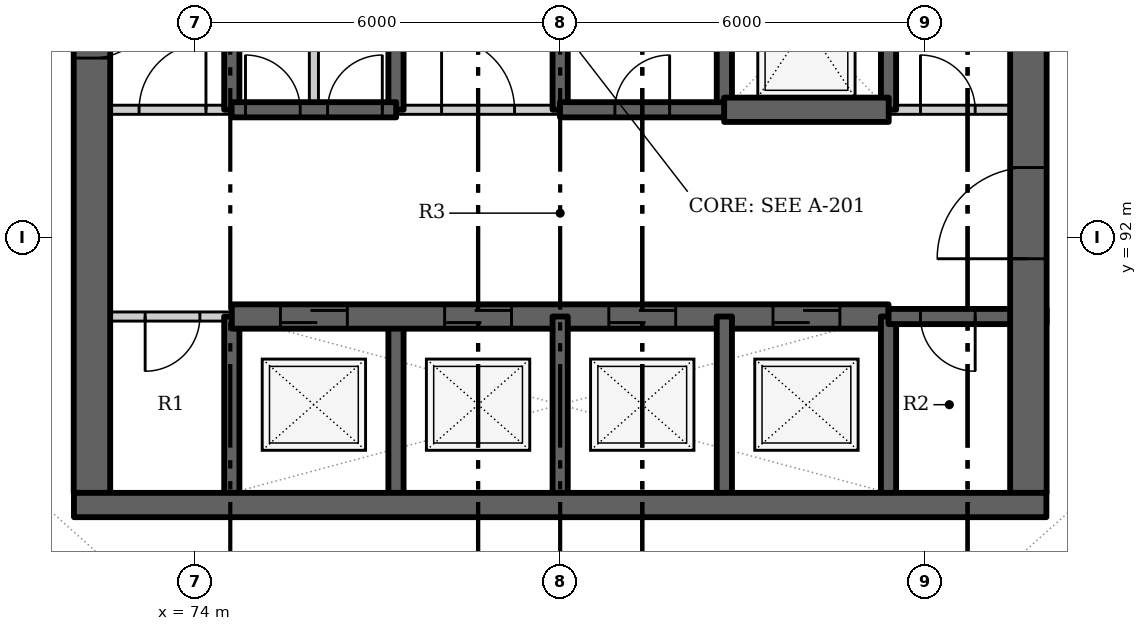
"""IFC4 building model, lengths in metres.
Left out: names, types, materials, properties, quantities, classifications, styles, units other than length and angle.
Written with IfcOpenShell. Run it as: python <this file> out.ifc"""

import sys

from ifc_helpers import new_model, si_unit, direction, frame, frame_2d, origin, place, context, subcontext, project, spatial, rectangle, extrude, element, fill, save


model = new_model("IFC4")
c1 = context("Model", 3, precision=1e-05, world=origin(), true_north=direction((0.0, 1.0)))
c2 = subcontext(c1, "Body", "Model", "MODEL_VIEW")
j1 = project(units=[si_unit("LENGTHUNIT", "METRE"), si_unit("PLANEANGLEUNIT", "RADIAN")], contexts=[c1])
p1 = place(None, origin())
s1 = spatial("IfcSite", under=j1, at=p1, CompositionType="ELEMENT")
p2 = place(p1, origin())
s2 = spatial("IfcBuilding", under=s1, at=p2, CompositionType="ELEMENT")
p3 = place(p2, origin())
s3 = spatial("IfcBuildingStorey", under=s2, at=p3, CompositionType="ELEMENT", Elevation=0.0)
p4 = place(p3, frame((74.6, 87.8, -1.8), z_axis=(0.0, 0.0, 1.0), x_axis=(0.0, 1.0, 0.0)))
e1 = element("IfcWall", 1, at=p4, inside=s3, PredefinedType="SHEAR", context=c2, shape_type="SweptSolid", body=[
    extrude(rectangle(XDim=2.9, YDim=0.25, at=frame_2d((1.45, 0.0))), origin(), (0.0, 0.0, 1.0), 8.1),
])
p5 = place(p3, frame((74.6, 94.1, -1.8), z_axis=(0.0, 0.0, 1.0), x_axis=(0.0, 1.0, 0.0)))
e2 = element("IfcWall", 2, at=p5, inside=s3, PredefinedType="SHEAR", context=c2, shape_type="SweptSolid", body=[
    extrude(rectangle(XDim=2.8, YDim=0.25, at=frame_2d((1.4, 0.0))), origin(), (0.0, 0.0, 1.0), 8.1),
])
p6 = place(p3, frame((74.6, 90.7, 0.0), z_axis=(0.0, 0.0, 1.0), x_axis=(-1.0, 0.0, 0.0)))
e3 = element("IfcWall", 3, at=p6, inside=s3, PredefinedType="PARTITIONING", context=c2, shape_type="SweptSolid", body=[
    extrude(rectangle(XDim=2.6, YDim=0.15, at=frame_2d((1.3, 0.0))), origin(), (0.0, 0.0, 1.0), 6.3),
])
p7 = place(p6, frame((0.525, 0.0, 0.0)))
e4 = element("IfcOpeningElement", 4, at=p7, cuts=e3, PredefinedType="OPENING", context=c2, shape_type="SweptSolid", body=[
    extrude(rectangle(XDim=0.9, YDim=2.1, at=frame_2d((0.45, 1.05))), frame((0.0, 0.085, 0.0), z_axis=(0.0, -1.0, 0.0), x_axis=(1.0, 0.0, 0.0)), (0.0, 0.0, 1.0), 0.17),
])
p8 = place(p3, frame((72.3, 96.9, -1.8), z_axis=(0.0, 0.0, 1.0), x_axis=(0.0, -1.0, 0.0)))
e5 = element("IfcWall", 5, at=p8, inside=s3, PredefinedType="SHEAR", context=c2, shape_type="SweptSolid", body=[
    extrude(rectangle(XDim=9.1, YDim=0.6, at=frame_2d((4.55, 0.0))), origin(), (0.0, 0.0, 1.0), 8.1),
])
p9 = place(p8, frame((0.85, 0.0, 1.8)))
e6 = element("IfcOpeningElement", 6, at=p9, cuts=e5, PredefinedType="OPENING", context=c2, shape_type="SweptSolid", body=[
    extrude(rectangle(XDim=1.1, YDim=2.1, at=frame_2d((0.55, 1.05))), frame((0.0, 0.31, 0.0), z_axis=(0.0, -1.0, 0.0), x_axis=(1.0, 0.0, 0.0)), (0.0, 0.0, 1.0), 0.62),
])
p10 = place(p3, frame((77.3, 87.8, -1.8), z_axis=(0.0, 0.0, 1.0), x_axis=(0.0, 1.0, 0.0)))
e7 = element("IfcWall", 7, at=p10, inside=s3, PredefinedType="SHEAR", context=c2, shape_type="SweptSolid", body=[
    extrude(rectangle(XDim=2.9, YDim=0.25, at=frame_2d((1.45, 0.0))), origin(), (0.0, 0.0, 1.0), 8.1),
])
p11 = place(p3, frame((77.3, 94.1, -1.8), z_axis=(0.0, 0.0, 1.0), x_axis=(0.0, 1.0, 0.0)))
e8 = element("IfcWall", 8, at=p11, inside=s3, PredefinedType="SHEAR", context=c2, shape_type="SweptSolid", body=[
    extrude(rectangle(XDim=2.8, YDim=0.25, at=frame_2d((1.4, 0.0))), origin(), (0.0, 0.0, 1.0), 8.1),
])
p12 = place(p3, frame((74.6, 90.7, -1.8), z_axis=(0.0, 0.0, 1.0), x_axis=(1.0, 0.0, 0.0)))
e9 = element("IfcWall", 9, at=p12, inside=s3, PredefinedType="SHEAR", context=c2, shape_type="SweptSolid", body=[
    extrude(rectangle(XDim=10.8, YDim=0.4, at=frame_2d((5.4, 0.0))), origin(), (0.0, 0.0, 1.0), 8.1),
])
p13 = place(p12, frame((0.8, 0.0, 1.8)))
e10 = element("IfcOpeningElement", 10, at=p13, cuts=e9, PredefinedType="OPENING", context=c2, shape_type="SweptSolid", body=[
    extrude(rectangle(XDim=1.1, YDim=2.1, at=frame_2d((0.55, 1.05))), frame((0.0, 0.21, 0.0), z_axis=(0.0, -1.0, 0.0), x_axis=(1.0, 0.0, 0.0)), (0.0, 0.0, 1.0), 0.42),
])
p14 = place(p12, frame((3.5, 0.0, 1.8)))
e11 = element("IfcOpeningElement", 11, at=p14, cuts=e9, PredefinedType="OPENING", context=c2, shape_type="SweptSolid", body=[
    extrude(rectangle(XDim=1.1, YDim=2.1, at=frame_2d((0.55, 1.05))), frame((0.0, 0.21, 0.0), z_axis=(0.0, -1.0, 0.0), x_axis=(1.0, 0.0, 0.0)), (0.0, 0.0, 1.0), 0.42),
])
p15 = place(p12, frame((6.2, 0.0, 1.8)))
e12 = element("IfcOpeningElement", 12, at=p15, cuts=e9, PredefinedType="OPENING", context=c2, shape_type="SweptSolid", body=[
    extrude(rectangle(XDim=1.1, YDim=2.1, at=frame_2d((0.55, 1.05))), frame((0.0, 0.21, 0.0), z_axis=(0.0, -1.0, 0.0), x_axis=(1.0, 0.0, 0.0)), (0.0, 0.0, 1.0), 0.42),
])
p16 = place(p12, frame((8.9, 0.0, 1.8)))
e13 = element("IfcOpeningElement", 13, at=p16, cuts=e9, PredefinedType="OPENING", context=c2, shape_type="SweptSolid", body=[
    extrude(rectangle(XDim=1.1, YDim=2.1, at=frame_2d((0.55, 1.05))), frame((0.0, 0.21, 0.0), z_axis=(0.0, -1.0, 0.0), x_axis=(1.0, 0.0, 0.0)), (0.0, 0.0, 1.0), 0.42),
])
p17 = place(p3, frame((80.0, 87.8, -1.8), z_axis=(0.0, 0.0, 1.0), x_axis=(0.0, 1.0, 0.0)))
e14 = element("IfcWall", 14, at=p17, inside=s3, PredefinedType="SHEAR", context=c2, shape_type="SweptSolid", body=[
    extrude(rectangle(XDim=2.9, YDim=0.25, at=frame_2d((1.45, 0.0))), origin(), (0.0, 0.0, 1.0), 8.1),
])
p18 = place(p3, frame((80.0, 94.1, -1.8), z_axis=(0.0, 0.0, 1.0), x_axis=(0.0, 1.0, 0.0)))
e15 = element("IfcWall", 15, at=p18, inside=s3, PredefinedType="SHEAR", context=c2, shape_type="SweptSolid", body=[
    extrude(rectangle(XDim=2.8, YDim=0.25, at=frame_2d((1.4, 0.0))), origin(), (0.0, 0.0, 1.0), 8.1),
])
p19 = place(p3, frame((82.7, 87.8, -1.8), z_axis=(0.0, 0.0, 1.0), x_axis=(0.0, 1.0, 0.0)))
e16 = element("IfcWall", 16, at=p19, inside=s3, PredefinedType="SHEAR", context=c2, shape_type="SweptSolid", body=[
    extrude(rectangle(XDim=2.9, YDim=0.25, at=frame_2d((1.45, 0.0))), origin(), (0.0, 0.0, 1.0), 8.1),
])
p20 = place(p3, frame((82.7, 94.1, -1.8), z_axis=(0.0, 0.0, 1.0), x_axis=(0.0, 1.0, 0.0)))
e17 = element("IfcWall", 17, at=p20, inside=s3, PredefinedType="SHEAR", context=c2, shape_type="SweptSolid", body=[
    extrude(rectangle(XDim=2.8, YDim=0.25, at=frame_2d((1.4, 0.0))), origin(), (0.0, 0.0, 1.0), 8.1),
])
p21 = place(p3, frame((85.4, 87.8, -1.8), z_axis=(0.0, 0.0, 1.0), x_axis=(0.0, 1.0, 0.0)))
e18 = element("IfcWall", 18, at=p21, inside=s3, PredefinedType="SHEAR", context=c2, shape_type="SweptSolid", body=[
    extrude(rectangle(XDim=2.9, YDim=0.25, at=frame_2d((1.45, 0.0))), origin(), (0.0, 0.0, 1.0), 8.1),
])
p22 = place(p3, frame((85.4, 94.1, -1.8), z_axis=(0.0, 0.0, 1.0), x_axis=(0.0, 1.0, 0.0)))
e19 = element("IfcWall", 19, at=p22, inside=s3, PredefinedType="SHEAR", context=c2, shape_type="SweptSolid", body=[
    extrude(rectangle(XDim=2.8, YDim=0.25, at=frame_2d((1.4, 0.0))), origin(), (0.0, 0.0, 1.0), 8.1),
])
p23 = place(p3, frame((88.0, 90.7, -1.8), z_axis=(0.0, 0.0, 1.0), x_axis=(-1.0, 0.0, 0.0)))
e20 = element("IfcWall", 20, at=p23, inside=s3, PredefinedType="SHEAR", context=c2, shape_type="SweptSolid", body=[
    extrude(rectangle(XDim=2.6, YDim=0.25, at=frame_2d((1.3, 0.0))), origin(), (0.0, 0.0, 1.0), 8.1),
])
p24 = place(p23, frame((1.175, 0.0, 1.8)))
e21 = element("IfcOpeningElement", 21, at=p24, cuts=e20, PredefinedType="OPENING", context=c2, shape_type="SweptSolid", body=[
    extrude(rectangle(XDim=0.9, YDim=2.1, at=frame_2d((0.45, 1.05))), frame((0.0, 0.135, 0.0), z_axis=(0.0, -1.0, 0.0), x_axis=(1.0, 0.0, 0.0)), (0.0, 0.0, 1.0), 0.27),
])
p25 = place(p3, frame((87.7, 87.8, -1.8), z_axis=(0.0, 0.0, 1.0), x_axis=(0.0, 1.0, 0.0)))
e22 = element("IfcWall", 22, at=p25, inside=s3, PredefinedType="SHEAR", context=c2, shape_type="SweptSolid", body=[
    extrude(rectangle(XDim=15.6, YDim=0.6, at=frame_2d((7.8, 0.0))), origin(), (0.0, 0.0, 1.0), 8.1),
])
p26 = place(p25, frame((3.85, 0.0, 1.8)))
e23 = element("IfcOpeningElement", 23, at=p26, cuts=e22, PredefinedType="OPENING", context=c2, shape_type="SweptSolid", body=[
    extrude(rectangle(XDim=1.5, YDim=2.1, at=frame_2d((0.75, 1.05))), frame((0.0, 0.31, 0.0), z_axis=(0.0, -1.0, 0.0), x_axis=(1.0, 0.0, 0.0)), (0.0, 0.0, 1.0), 0.62),
])
p27 = place(p25, frame((11.799, 0.0, 1.8)))
e24 = element("IfcOpeningElement", 24, at=p27, cuts=e22, PredefinedType="OPENING", context=c2, shape_type="SweptSolid", body=[
    extrude(rectangle(XDim=1.1, YDim=2.1, at=frame_2d((0.55, 1.05))), frame((0.0, 0.31, 0.0), z_axis=(0.0, -1.0, 0.0), x_axis=(1.0, 0.0, 0.0)), (0.0, 0.0, 1.0), 0.62),
])
p28 = place(p3, frame((72.0, 94.1, 0.0), z_axis=(0.0, 0.0, 1.0), x_axis=(1.0, 0.0, 0.0)))
e25 = element("IfcWall", 25, at=p28, inside=s3, PredefinedType="PARTITIONING", context=c2, shape_type="SweptSolid", body=[
    extrude(rectangle(XDim=2.603, YDim=0.15, at=frame_2d((1.302, 0.0))), origin(), (0.0, 0.0, 1.0), 6.3),
])
p29 = place(p28, frame((1.075, 0.0, 0.0)))
e26 = element("IfcOpeningElement", 26, at=p29, cuts=e25, PredefinedType="OPENING", context=c2, shape_type="SweptSolid", body=[
    extrude(rectangle(XDim=1.1, YDim=2.1, at=frame_2d((0.55, 1.05))), frame((0.0, 0.085, 0.0), z_axis=(0.0, -1.0, 0.0), x_axis=(1.0, 0.0, 0.0)), (0.0, 0.0, 1.0), 0.17),
])
p30 = place(p3, frame((77.297, 94.1, 0.0), z_axis=(0.0, 0.0, 1.0), x_axis=(1.0, 0.0, 0.0)))
e27 = element("IfcWall", 27, at=p30, inside=s3, PredefinedType="PARTITIONING", context=c2, shape_type="SweptSolid", body=[
    extrude(rectangle(XDim=2.706, YDim=0.15, at=frame_2d((1.353, 0.0))), origin(), (0.0, 0.0, 1.0), 6.3),
])
p31 = place(p30, frame((0.753, 0.0, 0.0)))
e28 = element("IfcOpeningElement", 28, at=p31, cuts=e27, PredefinedType="OPENING", context=c2, shape_type="SweptSolid", body=[
    extrude(rectangle(XDim=1.2, YDim=2.1, at=frame_2d((0.6, 1.05))), frame((0.0, 0.085, 0.0), z_axis=(0.0, -1.0, 0.0), x_axis=(1.0, 0.0, 0.0)), (0.0, 0.0, 1.0), 0.17),
])
p32 = place(p3, frame((85.397, 94.1, 0.0), z_axis=(0.0, 0.0, 1.0), x_axis=(1.0, 0.0, 0.0)))
e29 = element("IfcWall", 29, at=p32, inside=s3, PredefinedType="PARTITIONING", context=c2, shape_type="SweptSolid", body=[
    extrude(rectangle(XDim=2.603, YDim=0.15, at=frame_2d((1.302, 0.0))), origin(), (0.0, 0.0, 1.0), 6.3),
])
p33 = place(p32, frame((0.528, 0.0, 0.0)))
e30 = element("IfcOpeningElement", 30, at=p33, cuts=e29, PredefinedType="OPENING", context=c2, shape_type="SweptSolid", body=[
    extrude(rectangle(XDim=0.9, YDim=2.1, at=frame_2d((0.45, 1.05))), frame((0.0, 0.085, 0.0), z_axis=(0.0, -1.0, 0.0), x_axis=(1.0, 0.0, 0.0)), (0.0, 0.0, 1.0), 0.17),
])
p34 = place(p3, frame((74.597, 94.1, -1.8), z_axis=(0.0, 0.0, 1.0), x_axis=(1.0, 0.0, 0.0)))
e31 = element("IfcWall", 31, at=p34, inside=s3, PredefinedType="SHEAR", context=c2, shape_type="SweptSolid", body=[
    extrude(rectangle(XDim=2.706, YDim=0.25, at=frame_2d((1.353, 0.0))), origin(), (0.0, 0.0, 1.0), 8.1),
])
p35 = place(p34, frame((0.228, 0.0, 1.8)))
e32 = element("IfcOpeningElement", 32, at=p35, cuts=e31, PredefinedType="OPENING", context=c2, shape_type="SweptSolid", body=[
    extrude(rectangle(XDim=0.9, YDim=2.1, at=frame_2d((0.45, 1.05))), frame((0.0, 0.135, 0.0), z_axis=(0.0, -1.0, 0.0), x_axis=(1.0, 0.0, 0.0)), (0.0, 0.0, 1.0), 0.27),
])
p36 = place(p34, frame((1.578, 0.0, 1.8)))
e33 = element("IfcOpeningElement", 33, at=p36, cuts=e31, PredefinedType="OPENING", context=c2, shape_type="SweptSolid", body=[
    extrude(rectangle(XDim=0.9, YDim=2.1, at=frame_2d((0.45, 1.05))), frame((0.0, 0.135, 0.0), z_axis=(0.0, -1.0, 0.0), x_axis=(1.0, 0.0, 0.0)), (0.0, 0.0, 1.0), 0.27),
])
p37 = place(p3, frame((79.997, 94.1, -1.8), z_axis=(0.0, 0.0, 1.0), x_axis=(1.0, 0.0, 0.0)))
e34 = element("IfcWall", 34, at=p37, inside=s3, PredefinedType="SHEAR", context=c2, shape_type="SweptSolid", body=[
    extrude(rectangle(XDim=2.706, YDim=0.25, at=frame_2d((1.353, 0.0))), origin(), (0.0, 0.0, 1.0), 8.1),
])
p38 = place(p37, frame((0.903, 0.0, 1.8)))
e35 = element("IfcOpeningElement", 35, at=p38, cuts=e34, PredefinedType="OPENING", context=c2, shape_type="SweptSolid", body=[
    extrude(rectangle(XDim=0.9, YDim=2.1, at=frame_2d((0.45, 1.05))), frame((0.0, 0.135, 0.0), z_axis=(0.0, -1.0, 0.0), x_axis=(1.0, 0.0, 0.0)), (0.0, 0.0, 1.0), 0.27),
])
p39 = place(p3, frame((82.697, 94.1, -1.8), z_axis=(0.0, 0.0, 1.0), x_axis=(1.0, 0.0, 0.0)))
e36 = element("IfcWall", 36, at=p39, inside=s3, PredefinedType="SHEAR", context=c2, shape_type="SweptSolid", body=[
    extrude(rectangle(XDim=2.706, YDim=0.4, at=frame_2d((1.353, 0.0))), origin(), (0.0, 0.0, 1.0), 8.1),
])
p40 = place(p3, frame((75.95, 94.1, 0.0), z_axis=(0.0, 0.0, 1.0), x_axis=(0.0, 1.0, 0.0)))
e37 = element("IfcWall", 37, at=p40, inside=s3, PredefinedType="PARTITIONING", context=c2, shape_type="SweptSolid", body=[
    extrude(rectangle(XDim=2.8, YDim=0.15, at=frame_2d((1.4, 0.0))), origin(), (0.0, 0.0, 1.0), 6.3),
])
p41 = place(p3, frame((72.004, 87.6, -1.8), z_axis=(0.0, 0.0, 1.0), x_axis=(1.0, 0.0, 0.0)))
e38 = element("IfcWall", 38, at=p41, inside=s3, PredefinedType="SHEAR", context=c2, shape_type="SweptSolid", body=[
    extrude(rectangle(XDim=15.992, YDim=0.4, at=frame_2d((7.996, 0.0))), origin(), (0.0, 0.0, 1.0), 8.1),
])
p42 = place(p7, origin())
e39 = element("IfcDoor", 39, at=p42, inside=s3, OperationType="SINGLE_SWING_RIGHT", PredefinedType="DOOR", context=c2, shape_type="SweptSolid", body=[
    extrude(rectangle(XDim=0.9, YDim=2.1, at=frame_2d((0.45, 1.05))), frame((0.0, 0.025, 0.0), z_axis=(0.0, -1.0, 0.0), x_axis=(1.0, 0.0, 0.0)), (0.0, 0.0, 1.0), 0.05),
])
fill(e4, e39)
p43 = place(p13, origin())
e40 = element("IfcDoor", 40, at=p43, inside=s3, OperationType="SLIDING_TO_LEFT", PredefinedType="DOOR", context=c2, shape_type="SweptSolid", body=[
    extrude(rectangle(XDim=1.1, YDim=2.1, at=frame_2d((0.55, 1.05))), frame((0.0, 0.025, 0.0), z_axis=(0.0, -1.0, 0.0), x_axis=(1.0, 0.0, 0.0)), (0.0, 0.0, 1.0), 0.05),
])
fill(e10, e40)
p44 = place(p14, origin())
e41 = element("IfcDoor", 41, at=p44, inside=s3, OperationType="SLIDING_TO_LEFT", PredefinedType="DOOR", context=c2, shape_type="SweptSolid", body=[
    extrude(rectangle(XDim=1.1, YDim=2.1, at=frame_2d((0.55, 1.05))), frame((0.0, 0.025, 0.0), z_axis=(0.0, -1.0, 0.0), x_axis=(1.0, 0.0, 0.0)), (0.0, 0.0, 1.0), 0.05),
])
fill(e11, e41)
p45 = place(p15, origin())
e42 = element("IfcDoor", 42, at=p45, inside=s3, OperationType="SLIDING_TO_LEFT", PredefinedType="DOOR", context=c2, shape_type="SweptSolid", body=[
    extrude(rectangle(XDim=1.1, YDim=2.1, at=frame_2d((0.55, 1.05))), frame((0.0, 0.025, 0.0), z_axis=(0.0, -1.0, 0.0), x_axis=(1.0, 0.0, 0.0)), (0.0, 0.0, 1.0), 0.05),
])
fill(e12, e42)
p46 = place(p16, origin())
e43 = element("IfcDoor", 43, at=p46, inside=s3, OperationType="SLIDING_TO_LEFT", PredefinedType="DOOR", context=c2, shape_type="SweptSolid", body=[
    extrude(rectangle(XDim=1.1, YDim=2.1, at=frame_2d((0.55, 1.05))), frame((0.0, 0.025, 0.0), z_axis=(0.0, -1.0, 0.0), x_axis=(1.0, 0.0, 0.0)), (0.0, 0.0, 1.0), 0.05),
])
fill(e13, e43)
p47 = place(p24, origin())
e44 = element("IfcDoor", 44, at=p47, inside=s3, OperationType="SINGLE_SWING_LEFT", PredefinedType="DOOR", context=c2, shape_type="SweptSolid", body=[
    extrude(rectangle(XDim=0.9, YDim=2.1, at=frame_2d((0.45, 1.05))), frame((0.0, 0.025, 0.0), z_axis=(0.0, -1.0, 0.0), x_axis=(1.0, 0.0, 0.0)), (0.0, 0.0, 1.0), 0.05),
])
fill(e21, e44)
p48 = place(p29, origin())
e45 = element("IfcDoor", 45, at=p48, inside=s3, OperationType="SINGLE_SWING_RIGHT", PredefinedType="DOOR", context=c2, shape_type="SweptSolid", body=[
    extrude(rectangle(XDim=1.1, YDim=2.1, at=frame_2d((0.55, 1.05))), frame((0.0, 0.025, 0.0), z_axis=(0.0, -1.0, 0.0), x_axis=(1.0, 0.0, 0.0)), (0.0, 0.0, 1.0), 0.05),
])
fill(e26, e45)
p49 = place(p35, origin())
e46 = element("IfcDoor", 46, at=p49, inside=s3, OperationType="SINGLE_SWING_LEFT", PredefinedType="DOOR", context=c2, shape_type="SweptSolid", body=[
    extrude(rectangle(XDim=0.9, YDim=2.1, at=frame_2d((0.45, 1.05))), frame((0.0, 0.025, 0.0), z_axis=(0.0, -1.0, 0.0), x_axis=(1.0, 0.0, 0.0)), (0.0, 0.0, 1.0), 0.05),
])
fill(e32, e46)
p50 = place(p36, origin())
e47 = element("IfcDoor", 47, at=p50, inside=s3, OperationType="SINGLE_SWING_RIGHT", PredefinedType="DOOR", context=c2, shape_type="SweptSolid", body=[
    extrude(rectangle(XDim=0.9, YDim=2.1, at=frame_2d((0.45, 1.05))), frame((0.0, 0.025, 0.0), z_axis=(0.0, -1.0, 0.0), x_axis=(1.0, 0.0, 0.0)), (0.0, 0.0, 1.0), 0.05),
])
fill(e33, e47)
p51 = place(p31, origin())
e48 = element("IfcDoor", 48, at=p51, inside=s3, OperationType="DOUBLE_DOOR_SINGLE_SWING", PredefinedType="DOOR", context=c2, shape_type="SweptSolid", body=[
    extrude(rectangle(XDim=1.2, YDim=2.1, at=frame_2d((0.6, 1.05))), frame((0.0, 0.025, 0.0), z_axis=(0.0, -1.0, 0.0), x_axis=(1.0, 0.0, 0.0)), (0.0, 0.0, 1.0), 0.05),
])
fill(e28, e48)
p52 = place(p38, origin())
e49 = element("IfcDoor", 49, at=p52, inside=s3, OperationType="SINGLE_SWING_RIGHT", PredefinedType="DOOR", context=c2, shape_type="SweptSolid", body=[
    extrude(rectangle(XDim=0.9, YDim=2.1, at=frame_2d((0.45, 1.05))), frame((0.0, 0.025, 0.0), z_axis=(0.0, -1.0, 0.0), x_axis=(1.0, 0.0, 0.0)), (0.0, 0.0, 1.0), 0.05),
])
fill(e35, e49)
p53 = place(p33, origin())
e50 = element("IfcDoor", 50, at=p53, inside=s3, OperationType="SINGLE_SWING_LEFT", PredefinedType="DOOR", context=c2, shape_type="SweptSolid", body=[
    extrude(rectangle(XDim=0.9, YDim=2.1, at=frame_2d((0.45, 1.05))), frame((0.0, 0.025, 0.0), z_axis=(0.0, -1.0, 0.0), x_axis=(1.0, 0.0, 0.0)), (0.0, 0.0, 1.0), 0.05),
])
fill(e30, e50)
p54 = place(p9, origin())
e51 = element("IfcDoor", 51, at=p54, inside=s3, OperationType="SINGLE_SWING_LEFT", PredefinedType="DOOR", context=c2, shape_type="SweptSolid", body=[
    extrude(rectangle(XDim=1.1, YDim=2.1, at=frame_2d((0.55, 1.05))), frame((0.0, 0.025, 0.0), z_axis=(0.0, -1.0, 0.0), x_axis=(1.0, 0.0, 0.0)), (0.0, 0.0, 1.0), 0.05),
])
fill(e6, e51)
p55 = place(p26, origin())
e52 = element("IfcDoor", 52, at=p55, inside=s3, OperationType="DOUBLE_DOOR_SINGLE_SWING", PredefinedType="DOOR", context=c2, shape_type="SweptSolid", body=[
    extrude(rectangle(XDim=1.5, YDim=2.1, at=frame_2d((0.75, 1.05))), frame((0.0, 0.025, 0.0), z_axis=(0.0, -1.0, 0.0), x_axis=(1.0, 0.0, 0.0)), (0.0, 0.0, 1.0), 0.05),
])
fill(e23, e52)
save(model, sys.argv[1])
